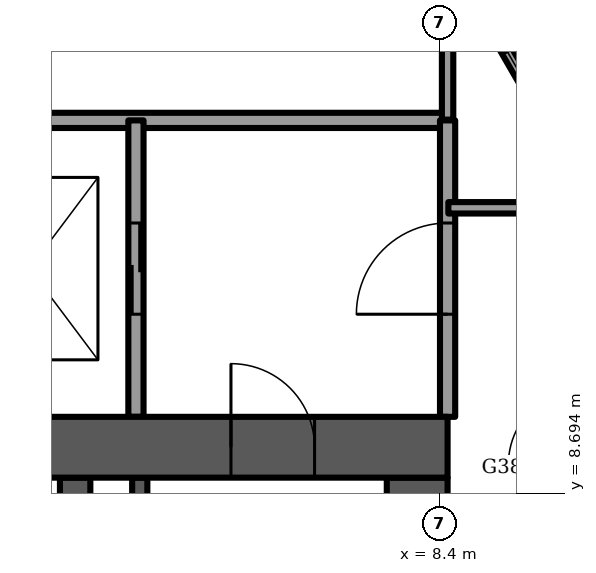
"""IFC4 building model, lengths in metres.
Left out: names, types, materials, properties, quantities, classifications, styles, units other than length and angle.
Written with IfcOpenShell. Run it as: python <this file> out.ifc"""

import sys

from ifc_helpers import new_model, si_unit, direction, frame, frame_2d, origin, place, context, subcontext, project, spatial, rectangle, extrude, element, fill, save


model = new_model("IFC4")
c1 = context("Model", 3, precision=1e-05, world=origin(), true_north=direction((0.0, 1.0)))
c2 = subcontext(c1, "Body", "Model", "MODEL_VIEW")
j1 = project(units=[si_unit("LENGTHUNIT", "METRE"), si_unit("PLANEANGLEUNIT", "RADIAN")], contexts=[c1])
p1 = place(None, origin())
s1 = spatial("IfcSite", under=j1, at=p1, CompositionType="ELEMENT")
p2 = place(p1, origin())
s2 = spatial("IfcBuilding", under=s1, at=p2, CompositionType="ELEMENT")
p3 = place(p2, frame((0.0, 0.0, 157.0)))
s3 = spatial("IfcBuildingStorey", under=s2, at=p3, CompositionType="ELEMENT", Elevation=157.0)
p4 = place(p3, frame((-8.5, 9.3, -0.3), z_axis=(0.0, 0.0, 1.0), x_axis=(1.0, 0.0, 0.0)))
e1 = element("IfcWall", 1, at=p4, inside=s3, PredefinedType="SHEAR", context=c2, shape_type="SweptSolid", body=[
    extrude(rectangle(XDim=17.0, YDim=0.8, at=frame_2d((8.5, 0.0))), origin(), (0.0, 0.0, 1.0), 3.75),
])
p5 = place(p4, frame((7.7, 0.0, 0.0)))
e2 = element("IfcOpeningElement", 2, at=p5, cuts=e1, PredefinedType="OPENING", context=c2, shape_type="SweptSolid", body=[
    extrude(rectangle(XDim=1.6, YDim=2.1, at=frame_2d((0.8, 1.05))), frame((0.0, 0.4, 0.0), z_axis=(0.0, -1.0, 0.0), x_axis=(1.0, 0.0, 0.0)), (0.0, 0.0, 1.0), 0.8),
])
p6 = place(p4, frame((1.75, 0.0, 0.0)))
e3 = element("IfcOpeningElement", 3, at=p6, cuts=e1, PredefinedType="OPENING", context=c2, shape_type="SweptSolid", body=[
    extrude(rectangle(XDim=1.1, YDim=2.1, at=frame_2d((0.55, 1.05))), frame((0.0, 0.4, 0.0), z_axis=(0.0, -1.0, 0.0), x_axis=(1.0, 0.0, 0.0)), (0.0, 0.0, 1.0), 0.8),
])
p7 = place(p4, frame((14.15, 0.0, 0.0)))
e4 = element("IfcOpeningElement", 4, at=p7, cuts=e1, PredefinedType="OPENING", context=c2, shape_type="SweptSolid", body=[
    extrude(rectangle(XDim=1.1, YDim=2.1, at=frame_2d((0.55, 1.05))), frame((0.0, 0.4, 0.0), z_axis=(0.0, -1.0, 0.0), x_axis=(1.0, 0.0, 0.0)), (0.0, 0.0, 1.0), 0.8),
])
p8 = place(p3, frame((8.1, -0.9, -0.3), z_axis=(0.0, 0.0, 1.0), x_axis=(0.0, 1.0, 0.0)))
e5 = element("IfcWall", 5, at=p8, inside=s3, PredefinedType="SHEAR", context=c2, shape_type="SweptSolid", body=[
    extrude(rectangle(XDim=9.8, YDim=0.8, at=frame_2d((4.9, 0.0))), origin(), (0.0, 0.0, 1.0), 3.75),
])
p9 = place(p8, frame((8.15, 0.0, 0.0)))
e6 = element("IfcOpeningElement", 6, at=p9, cuts=e5, PredefinedType="OPENING", context=c2, shape_type="SweptSolid", body=[
    extrude(rectangle(XDim=1.1, YDim=2.1, at=frame_2d((0.55, 1.05))), frame((0.0, 0.4, 0.0), z_axis=(0.0, -1.0, 0.0), x_axis=(1.0, 0.0, 0.0)), (0.0, 0.0, 1.0), 0.8),
])
p10 = place(p3, frame((3.6, -0.9, -0.3), z_axis=(0.0, 0.0, 1.0), x_axis=(0.0, 1.0, 0.0)))
e7 = element("IfcWall", 7, at=p10, inside=s3, PredefinedType="SHEAR", context=c2, shape_type="SweptSolid", body=[
    extrude(rectangle(XDim=9.8, YDim=0.4, at=frame_2d((4.9, 0.0))), origin(), (0.0, 0.0, 1.0), 3.75),
])
p11 = place(p3, frame((17.428, 0.402, 0.0), z_axis=(0.0, 0.0, 1.0), x_axis=(-0.500000203029, 0.866025286565, 0.0)))
e8 = element("IfcWall", 8, at=p11, inside=s3, PredefinedType="SOLIDWALL", context=c2, shape_type="SweptSolid", body=[
    extrude(rectangle(XDim=19.504, YDim=0.15, at=frame_2d((9.752, 0.0))), origin(), (0.0, 0.0, 1.0), 3.45),
])
p12 = place(p11, frame((4.947, 0.0, 0.0)))
e9 = element("IfcOpeningElement", 9, at=p12, cuts=e8, PredefinedType="OPENING", context=c2, shape_type="SweptSolid", body=[
    extrude(rectangle(XDim=1.4, YDim=2.4, at=frame_2d((0.7, 1.2))), frame((0.0, 0.075, 0.0), z_axis=(0.0, -1.0, 0.0), x_axis=(1.0, 0.0, 0.0)), (0.0, 0.0, 1.0), 0.15),
])
p13 = place(p11, frame((8.666, 0.0, 0.15)))
e10 = element("IfcOpeningElement", 10, at=p13, cuts=e8, PredefinedType="OPENING", context=c2, shape_type="SweptSolid", body=[
    extrude(rectangle(XDim=1.6, YDim=2.85, at=frame_2d((0.8, 1.425))), frame((0.0, 0.075, 0.0), z_axis=(0.0, -1.0, 0.0), x_axis=(1.0, 0.0, 0.0)), (0.0, 0.0, 1.0), 0.15),
])
p14 = place(p11, frame((10.866, 0.0, 0.15)))
e11 = element("IfcOpeningElement", 11, at=p14, cuts=e8, PredefinedType="OPENING", context=c2, shape_type="SweptSolid", body=[
    extrude(rectangle(XDim=1.4, YDim=2.85, at=frame_2d((0.7, 1.425))), frame((0.0, 0.075, 0.0), z_axis=(0.0, -1.0, 0.0), x_axis=(1.0, 0.0, 0.0)), (0.0, 0.0, 1.0), 0.15),
])
p15 = place(p11, frame((14.684, 0.0, 0.15)))
e12 = element("IfcOpeningElement", 12, at=p15, cuts=e8, PredefinedType="OPENING", context=c2, shape_type="SweptSolid", body=[
    extrude(rectangle(XDim=1.6, YDim=2.85, at=frame_2d((0.8, 1.425))), frame((0.0, 0.075, 0.0), z_axis=(0.0, -1.0, 0.0), x_axis=(1.0, 0.0, 0.0)), (0.0, 0.0, 1.0), 0.15),
])
p16 = place(p11, frame((1.233, 0.0, 0.15)))
e13 = element("IfcOpeningElement", 13, at=p16, cuts=e8, PredefinedType="OPENING", context=c2, shape_type="SweptSolid", body=[
    extrude(rectangle(XDim=1.6, YDim=2.73, at=frame_2d((0.8, 1.365))), frame((0.0, 0.075, 0.0), z_axis=(0.0, -1.0, 0.0), x_axis=(1.0, 0.0, 0.0)), (0.0, 0.0, 1.0), 0.15),
])
p17 = place(p11, frame((18.369, 0.0, 0.15)))
e14 = element("IfcOpeningElement", 14, at=p17, cuts=e8, PredefinedType="OPENING", context=c2, shape_type="SweptSolid", body=[
    extrude(rectangle(XDim=0.9, YDim=2.73, at=frame_2d((0.45, 1.365))), frame((0.0, 0.075, 0.0), z_axis=(0.0, -1.0, 0.0), x_axis=(1.0, 0.0, 0.0)), (0.0, 0.0, 1.0), 0.15),
])
p18 = place(p3, frame((4.45, 0.9, -0.3), z_axis=(0.0, 0.0, 1.0), x_axis=(0.0, 1.0, 0.0)))
e15 = element("IfcWall", 15, at=p18, inside=s3, PredefinedType="SOLIDWALL", context=c2, shape_type="SweptSolid", body=[
    extrude(rectangle(XDim=8.0, YDim=0.2, at=frame_2d((4.0, 0.0))), origin(), (0.0, 0.0, 1.0), 3.75),
])
p19 = place(p3, frame((-8.5, 13.6, 0.0), z_axis=(0.0, 0.0, 1.0), x_axis=(1.0, 0.0, 0.0)))
e16 = element("IfcWall", 16, at=p19, inside=s3, PredefinedType="PARTITIONING", context=c2, shape_type="SweptSolid", body=[
    extrude(rectangle(XDim=17.0, YDim=0.2, at=frame_2d((8.5, 0.0))), origin(), (0.0, 0.0, 1.0), 3.45),
])
p20 = place(p19, frame((8.0, 0.0, 0.0)))
e17 = element("IfcOpeningElement", 17, at=p20, cuts=e16, PredefinedType="OPENING", context=c2, shape_type="SweptSolid", body=[
    extrude(rectangle(XDim=1.0, YDim=2.1, at=frame_2d((0.5, 1.05))), frame((0.0, 0.1, 0.0), z_axis=(0.0, -1.0, 0.0), x_axis=(1.0, 0.0, 0.0)), (0.0, 0.0, 1.0), 0.2),
])
p21 = place(p3, frame((8.5, 9.7, 0.0), z_axis=(0.0, 0.0, 1.0), x_axis=(0.0, 1.0, 0.0)))
e18 = element("IfcWall", 18, at=p21, inside=s3, PredefinedType="PARTITIONING", context=c2, shape_type="SweptSolid", body=[
    extrude(rectangle(XDim=3.9, YDim=0.2, at=frame_2d((1.95, 0.0))), origin(), (0.0, 0.0, 1.0), 3.45),
])
p22 = place(p21, frame((1.35, 0.0, 0.0)))
e19 = element("IfcOpeningElement", 19, at=p22, cuts=e18, PredefinedType="OPENING", context=c2, shape_type="SweptSolid", body=[
    extrude(rectangle(XDim=1.2, YDim=2.1, at=frame_2d((0.6, 1.05))), frame((0.0, 0.1, 0.0), z_axis=(0.0, -1.0, 0.0), x_axis=(1.0, 0.0, 0.0)), (0.0, 0.0, 1.0), 0.2),
])
p23 = place(p3, frame((4.4, 9.7, 0.0), z_axis=(0.0, 0.0, 1.0), x_axis=(0.0, 1.0, 0.0)))
e20 = element("IfcWall", 20, at=p23, inside=s3, PredefinedType="PARTITIONING", context=c2, shape_type="SweptSolid", body=[
    extrude(rectangle(XDim=3.9, YDim=0.2, at=frame_2d((1.95, 0.0))), origin(), (0.0, 0.0, 1.0), 3.45),
])
p24 = place(p23, frame((1.35, 0.0, 0.0)))
e21 = element("IfcOpeningElement", 21, at=p24, cuts=e20, PredefinedType="OPENING", context=c2, shape_type="SweptSolid", body=[
    extrude(rectangle(XDim=1.2, YDim=2.1, at=frame_2d((0.6, 1.05))), frame((0.0, 0.1, 0.0), z_axis=(0.0, -1.0, 0.0), x_axis=(1.0, 0.0, 0.0)), (0.0, 0.0, 1.0), 0.2),
])
p25 = place(p3, frame((8.51, 12.45, 0.0), z_axis=(0.0, 0.0, 1.0), x_axis=(1.0, 0.0, 0.0)))
e22 = element("IfcWall", 22, at=p25, inside=s3, PredefinedType="PARTITIONING", context=c2, shape_type="SweptSolid", body=[
    extrude(rectangle(XDim=2.014, YDim=0.15, at=frame_2d((1.007, 0.0))), origin(), (0.0, 0.0, 1.0), 3.45),
])
p26 = place(p3, frame((8.5, 13.61, 0.0), z_axis=(0.0, 0.0, 1.0), x_axis=(0.0, 1.0, 0.0)))
e23 = element("IfcWall", 23, at=p26, inside=s3, PredefinedType="PARTITIONING", context=c2, shape_type="SweptSolid", body=[
    extrude(rectangle(XDim=2.346, YDim=0.15, at=frame_2d((1.173, 0.0))), origin(), (0.0, 0.0, 1.0), 3.45),
])
p27 = place(p15, origin())
e24 = element("IfcWindow", 24, at=p27, inside=s3, PartitioningType="SINGLE_PANEL", PredefinedType="WINDOW", context=c2, shape_type="SweptSolid", body=[
    extrude(rectangle(XDim=1.6, YDim=2.85, at=frame_2d((0.8, 1.425))), frame((0.0, 0.03, 0.0), z_axis=(0.0, -1.0, 0.0), x_axis=(1.0, 0.0, 0.0)), (0.0, 0.0, 1.0), 0.06),
])
fill(e12, e24)
p28 = place(p7, origin())
e25 = element("IfcDoor", 25, at=p28, inside=s3, OperationType="SINGLE_SWING_RIGHT", PredefinedType="DOOR", context=c2, shape_type="SweptSolid", body=[
    extrude(rectangle(XDim=1.1, YDim=2.1, at=frame_2d((0.55, 1.05))), frame((0.0, 0.025, 0.0), z_axis=(0.0, -1.0, 0.0), x_axis=(1.0, 0.0, 0.0)), (0.0, 0.0, 1.0), 0.05),
])
fill(e4, e25)
p29 = place(p24, origin())
e26 = element("IfcDoor", 26, at=p29, inside=s3, OperationType="SLIDING_TO_LEFT", PredefinedType="DOOR", context=c2, shape_type="SweptSolid", body=[
    extrude(rectangle(XDim=1.2, YDim=2.1, at=frame_2d((0.6, 1.05))), frame((0.0, 0.025, 0.0), z_axis=(0.0, -1.0, 0.0), x_axis=(1.0, 0.0, 0.0)), (0.0, 0.0, 1.0), 0.05),
])
fill(e21, e26)
p30 = place(p22, origin())
e27 = element("IfcDoor", 27, at=p30, inside=s3, OperationType="SINGLE_SWING_LEFT", PredefinedType="DOOR", context=c2, shape_type="SweptSolid", body=[
    extrude(rectangle(XDim=1.2, YDim=2.1, at=frame_2d((0.6, 1.05))), frame((0.0, 0.025, 0.0), z_axis=(0.0, -1.0, 0.0), x_axis=(1.0, 0.0, 0.0)), (0.0, 0.0, 1.0), 0.05),
])
fill(e19, e27)
save(model, sys.argv[1])
